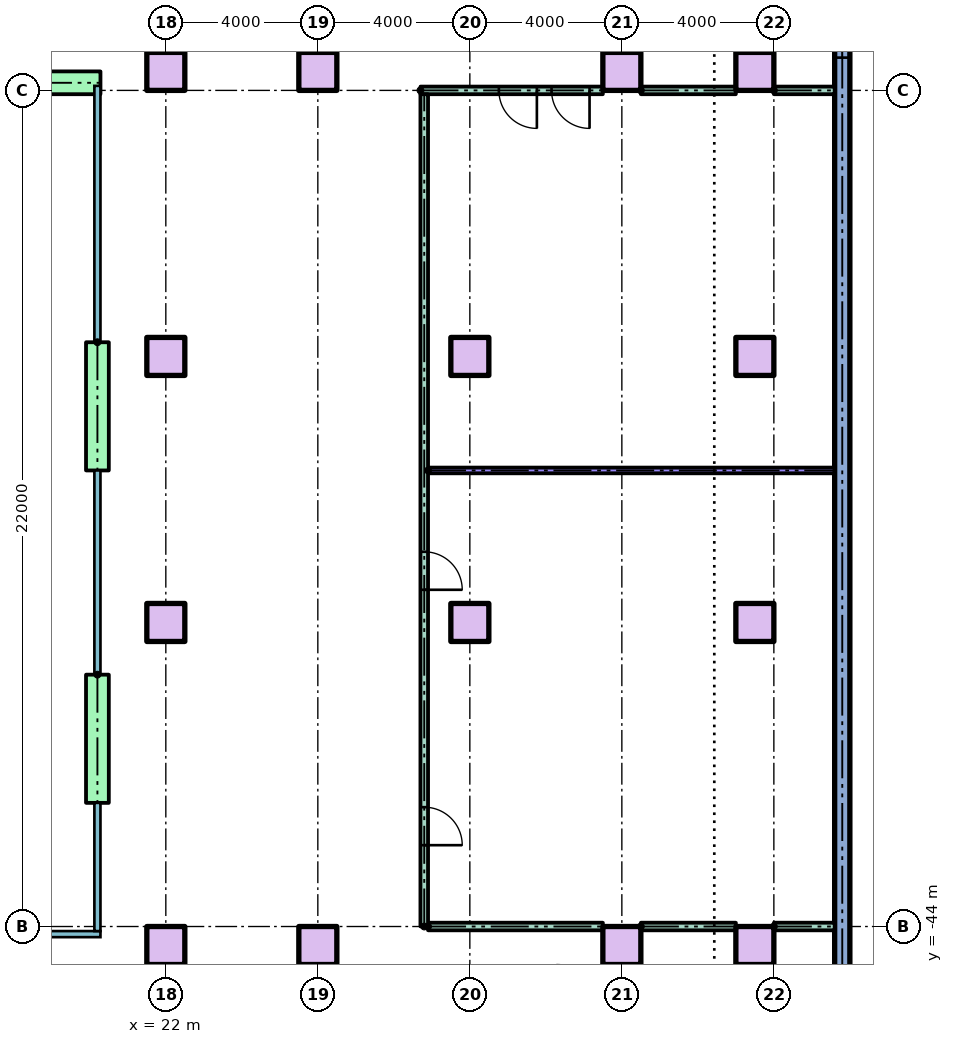
"""IFC4 building model, lengths in metres.
Left out: names, types, materials, properties, quantities, classifications, styles, units other than length and angle.
Written with IfcOpenShell. Run it as: python <this file> out.ifc"""

import sys

from ifc_helpers import new_model, si_unit, direction, frame, frame_2d, origin, origin_2d, place, context, subcontext, project, spatial, rectangle, extrude, element, fill, save


model = new_model("IFC4")
c1 = context("Model", 3, precision=1e-05, world=origin(), true_north=direction((0.0, 1.0)))
c2 = subcontext(c1, "Body", "Model", "MODEL_VIEW")
j1 = project(units=[si_unit("LENGTHUNIT", "METRE"), si_unit("PLANEANGLEUNIT", "RADIAN")], contexts=[c1])
p1 = place(None, origin())
s1 = spatial("IfcSite", under=j1, at=p1, CompositionType="ELEMENT")
p2 = place(p1, origin())
s2 = spatial("IfcBuilding", under=s1, at=p2, CompositionType="ELEMENT")
p3 = place(p2, frame((0.0, 0.0, 14.0)))
s3 = spatial("IfcBuildingStorey", under=s2, at=p3, CompositionType="ELEMENT", Elevation=14.0)
for number, where in (
    (1, (22.0, -44.5, 0.0)),
    (2, (26.0, -44.5, 0.0)),
    (3, (34.0, -44.5, 0.0)),
    (4, (37.5, -44.5, 0.0)),
    (5, (22.0, -36.0, 0.0)),
    (6, (30.0, -36.0, 0.0)),
    (7, (37.5, -36.0, 0.0)),
    (8, (22.0, -29.0, 0.0)),
    (9, (30.0, -29.0, 0.0)),
    (10, (37.5, -29.0, 0.0)),
    (11, (22.0, -21.5, 0.0)),
    (12, (26.0, -21.5, 0.0)),
    (13, (34.0, -21.5, 0.0)),
    (14, (37.5, -21.5, 0.0)),
):
    element("IfcColumn", number, at=place(p3, frame(where)), inside=s3, PredefinedType="COLUMN", context=c2, shape_type="SweptSolid", body=[
        extrude(rectangle(XDim=1.0, YDim=1.0, at=origin_2d()), origin(), (0.0, 0.0, 1.0), 4.0),
    ])
p4 = place(p3, frame((39.8, -50.0, 0.0), z_axis=(0.0, 0.0, 1.0), x_axis=(0.0, 1.0, 0.0)))
e15 = element("IfcWall", 15, at=p4, inside=s3, PredefinedType="STANDARD", context=c2, shape_type="SweptSolid", body=[
    extrude(rectangle(XDim=70.0, YDim=0.4, at=frame_2d((35.0, 0.0))), origin(), (0.0, 0.0, 1.0), 3.7),
])
p5 = place(p4, frame((0.75, 0.0, 0.9)))
e16 = element("IfcOpeningElement", 16, at=p5, cuts=e15, PredefinedType="OPENING", context=c2, shape_type="SweptSolid", body=[
    extrude(rectangle(XDim=2.4, YDim=2.1, at=frame_2d((1.2, 1.05))), frame((0.0, 0.21, 0.0), z_axis=(0.0, -1.0, 0.0), x_axis=(1.0, 0.0, 0.0)), (0.0, 0.0, 1.0), 0.42),
])
p6 = place(p4, frame((28.863, 0.0, 0.9)))
e17 = element("IfcOpeningElement", 17, at=p6, cuts=e15, PredefinedType="OPENING", context=c2, shape_type="SweptSolid", body=[
    extrude(rectangle(XDim=2.4, YDim=2.1, at=frame_2d((1.2, 1.05))), frame((0.0, 0.21, 0.0), z_axis=(0.0, -1.0, 0.0), x_axis=(1.0, 0.0, 0.0)), (0.0, 0.0, 1.0), 0.42),
])
p7 = place(p4, frame((32.988, 0.0, 0.9)))
e18 = element("IfcOpeningElement", 18, at=p7, cuts=e15, PredefinedType="OPENING", context=c2, shape_type="SweptSolid", body=[
    extrude(rectangle(XDim=2.4, YDim=2.1, at=frame_2d((1.2, 1.05))), frame((0.0, 0.21, 0.0), z_axis=(0.0, -1.0, 0.0), x_axis=(1.0, 0.0, 0.0)), (0.0, 0.0, 1.0), 0.42),
])
p8 = place(p4, frame((37.113, 0.0, 0.9)))
e19 = element("IfcOpeningElement", 19, at=p8, cuts=e15, PredefinedType="OPENING", context=c2, shape_type="SweptSolid", body=[
    extrude(rectangle(XDim=2.4, YDim=2.1, at=frame_2d((1.2, 1.05))), frame((0.0, 0.21, 0.0), z_axis=(0.0, -1.0, 0.0), x_axis=(1.0, 0.0, 0.0)), (0.0, 0.0, 1.0), 0.42),
])
p9 = place(p4, frame((41.238, 0.0, 0.9)))
e20 = element("IfcOpeningElement", 20, at=p9, cuts=e15, PredefinedType="OPENING", context=c2, shape_type="SweptSolid", body=[
    extrude(rectangle(XDim=2.4, YDim=2.1, at=frame_2d((1.2, 1.05))), frame((0.0, 0.21, 0.0), z_axis=(0.0, -1.0, 0.0), x_axis=(1.0, 0.0, 0.0)), (0.0, 0.0, 1.0), 0.42),
])
p10 = place(p4, frame((45.363, 0.0, 0.9)))
e21 = element("IfcOpeningElement", 21, at=p10, cuts=e15, PredefinedType="OPENING", context=c2, shape_type="SweptSolid", body=[
    extrude(rectangle(XDim=2.4, YDim=2.1, at=frame_2d((1.2, 1.05))), frame((0.0, 0.21, 0.0), z_axis=(0.0, -1.0, 0.0), x_axis=(1.0, 0.0, 0.0)), (0.0, 0.0, 1.0), 0.42),
])
p11 = place(p4, frame((49.488, 0.0, 0.9)))
e22 = element("IfcOpeningElement", 22, at=p11, cuts=e15, PredefinedType="OPENING", context=c2, shape_type="SweptSolid", body=[
    extrude(rectangle(XDim=2.4, YDim=2.1, at=frame_2d((1.2, 1.05))), frame((0.0, 0.21, 0.0), z_axis=(0.0, -1.0, 0.0), x_axis=(1.0, 0.0, 0.0)), (0.0, 0.0, 1.0), 0.42),
])
p12 = place(p4, frame((53.613, 0.0, 0.9)))
e23 = element("IfcOpeningElement", 23, at=p12, cuts=e15, PredefinedType="OPENING", context=c2, shape_type="SweptSolid", body=[
    extrude(rectangle(XDim=2.4, YDim=2.1, at=frame_2d((1.2, 1.05))), frame((0.0, 0.21, 0.0), z_axis=(0.0, -1.0, 0.0), x_axis=(1.0, 0.0, 0.0)), (0.0, 0.0, 1.0), 0.42),
])
p13 = place(p4, frame((57.738, 0.0, 0.9)))
e24 = element("IfcOpeningElement", 24, at=p13, cuts=e15, PredefinedType="OPENING", context=c2, shape_type="SweptSolid", body=[
    extrude(rectangle(XDim=2.4, YDim=2.1, at=frame_2d((1.2, 1.05))), frame((0.0, 0.21, 0.0), z_axis=(0.0, -1.0, 0.0), x_axis=(1.0, 0.0, 0.0)), (0.0, 0.0, 1.0), 0.42),
])
p14 = place(p4, frame((62.05, 0.0, 0.9)))
e25 = element("IfcOpeningElement", 25, at=p14, cuts=e15, PredefinedType="OPENING", context=c2, shape_type="SweptSolid", body=[
    extrude(rectangle(XDim=2.4, YDim=2.1, at=frame_2d((1.2, 1.05))), frame((0.0, 0.21, 0.0), z_axis=(0.0, -1.0, 0.0), x_axis=(1.0, 0.0, 0.0)), (0.0, 0.0, 1.0), 0.42),
])
p15 = place(p4, frame((66.55, 0.0, 0.9)))
e26 = element("IfcOpeningElement", 26, at=p15, cuts=e15, PredefinedType="OPENING", context=c2, shape_type="SweptSolid", body=[
    extrude(rectangle(XDim=2.4, YDim=2.1, at=frame_2d((1.2, 1.05))), frame((0.0, 0.21, 0.0), z_axis=(0.0, -1.0, 0.0), x_axis=(1.0, 0.0, 0.0)), (0.0, 0.0, 1.0), 0.42),
])
p16 = place(p3, frame((18.53, -21.8, 0.0)))
e27 = element("IfcWall", 27, at=p16, inside=s3, PredefinedType="STANDARD", context=c2, shape_type="SweptSolid", body=[
    extrude(rectangle(XDim=1.75, YDim=0.6, at=frame_2d((0.875, 0.0))), origin(), (0.0, 0.0, 1.0), 3.7),
])
for number, where, z_axis, x_axis in (
    (28, (20.2, -28.627, 0.0), (0.0, 0.0, 1.0), (0.0, -1.0, 0.0)),
    (29, (20.2, -37.373, 0.0), (0.0, 0.0, 1.0), (0.0, -1.0, 0.0)),
):
    element("IfcWall", number, at=place(p3, frame(where, z_axis=z_axis, x_axis=x_axis)), inside=s3, PredefinedType="STANDARD", context=c2, shape_type="SweptSolid", body=[
        extrude(rectangle(XDim=3.373, YDim=0.6, at=frame_2d((1.687, 0.0))), origin(), (0.0, 0.0, 1.0), 3.7),
    ])
p17 = place(p3, frame((28.9, -44.0, 0.0)))
e30 = element("IfcWall", 30, at=p17, inside=s3, PredefinedType="PARTITIONING", context=c2, shape_type="SweptSolid", body=[
    extrude(rectangle(XDim=4.6, YDim=0.2, at=frame_2d((2.3, 0.0))), origin(), (0.0, 0.0, 1.0), 3.7),
])
p18 = place(p3, frame((34.5, -44.0, 0.0)))
e31 = element("IfcWall", 31, at=p18, inside=s3, PredefinedType="PARTITIONING", context=c2, shape_type="SweptSolid", body=[
    extrude(rectangle(XDim=2.5, YDim=0.2, at=frame_2d((1.25, 0.0))), origin(), (0.0, 0.0, 1.0), 3.7),
])
p19 = place(p3, frame((38.0, -44.0, 0.0)))
e32 = element("IfcWall", 32, at=p19, inside=s3, PredefinedType="PARTITIONING", context=c2, shape_type="SweptSolid", body=[
    extrude(rectangle(XDim=1.6, YDim=0.2, at=frame_2d((0.8, 0.0))), origin(), (0.0, 0.0, 1.0), 3.7),
])
p20 = place(p3, frame((28.9, -32.0, 0.0)))
e33 = element("IfcWall", 33, at=p20, inside=s3, PredefinedType="PARTITIONING", context=c2, shape_type="SweptSolid", body=[
    extrude(rectangle(XDim=10.7, YDim=0.15, at=frame_2d((5.35, 0.0))), origin(), (0.0, 0.0, 1.0), 3.7),
])
p21 = place(p3, frame((28.7, -22.0, 0.0)))
e34 = element("IfcWall", 34, at=p21, inside=s3, PredefinedType="PARTITIONING", context=c2, shape_type="SweptSolid", body=[
    extrude(rectangle(XDim=4.8, YDim=0.2, at=frame_2d((2.4, 0.0))), origin(), (0.0, 0.0, 1.0), 3.7),
])
p22 = place(p21, frame((2.064, 0.0, 0.0)))
e35 = element("IfcOpeningElement", 35, at=p22, cuts=e34, PredefinedType="OPENING", context=c2, shape_type="SweptSolid", body=[
    extrude(rectangle(XDim=1.0, YDim=2.1, at=frame_2d((0.5, 1.05))), frame((0.0, 0.11, 0.0), z_axis=(0.0, -1.0, 0.0), x_axis=(1.0, 0.0, 0.0)), (0.0, 0.0, 1.0), 0.22),
])
p23 = place(p21, frame((3.45, 0.0, 0.0)))
e36 = element("IfcOpeningElement", 36, at=p23, cuts=e34, PredefinedType="OPENING", context=c2, shape_type="SweptSolid", body=[
    extrude(rectangle(XDim=1.0, YDim=2.1, at=frame_2d((0.5, 1.05))), frame((0.0, 0.11, 0.0), z_axis=(0.0, -1.0, 0.0), x_axis=(1.0, 0.0, 0.0)), (0.0, 0.0, 1.0), 0.22),
])
p24 = place(p3, frame((34.5, -22.0, 0.0)))
e37 = element("IfcWall", 37, at=p24, inside=s3, PredefinedType="PARTITIONING", context=c2, shape_type="SweptSolid", body=[
    extrude(rectangle(XDim=2.5, YDim=0.2, at=frame_2d((1.25, 0.0))), origin(), (0.0, 0.0, 1.0), 3.7),
])
p25 = place(p3, frame((38.0, -22.0, 0.0)))
e38 = element("IfcWall", 38, at=p25, inside=s3, PredefinedType="PARTITIONING", context=c2, shape_type="SweptSolid", body=[
    extrude(rectangle(XDim=1.6, YDim=0.2, at=frame_2d((0.8, 0.0))), origin(), (0.0, 0.0, 1.0), 3.7),
])
p26 = place(p3, frame((28.8, -44.0, 0.0), z_axis=(0.0, 0.0, 1.0), x_axis=(0.0, 1.0, 0.0)))
e39 = element("IfcWall", 39, at=p26, inside=s3, PredefinedType="PARTITIONING", context=c2, shape_type="SweptSolid", body=[
    extrude(rectangle(XDim=21.9, YDim=0.2, at=frame_2d((10.95, 0.0))), origin(), (0.0, 0.0, 1.0), 3.7),
])
p27 = place(p26, frame((2.14, 0.0, 0.0)))
e40 = element("IfcOpeningElement", 40, at=p27, cuts=e39, PredefinedType="OPENING", context=c2, shape_type="SweptSolid", body=[
    extrude(rectangle(XDim=1.0, YDim=2.1, at=frame_2d((0.5, 1.05))), frame((0.0, 0.11, 0.0), z_axis=(0.0, -1.0, 0.0), x_axis=(1.0, 0.0, 0.0)), (0.0, 0.0, 1.0), 0.22),
])
p28 = place(p26, frame((8.86, 0.0, 0.0)))
e41 = element("IfcOpeningElement", 41, at=p28, cuts=e39, PredefinedType="OPENING", context=c2, shape_type="SweptSolid", body=[
    extrude(rectangle(XDim=1.0, YDim=2.1, at=frame_2d((0.5, 1.05))), frame((0.0, 0.11, 0.0), z_axis=(0.0, -1.0, 0.0), x_axis=(1.0, 0.0, 0.0)), (0.0, 0.0, 1.0), 0.22),
])
p29 = place(p6, origin())
e42 = element("IfcWindow", 42, at=p29, inside=s3, PartitioningType="SINGLE_PANEL", PredefinedType="WINDOW", context=c2, shape_type="SweptSolid", body=[
    extrude(rectangle(XDim=2.4, YDim=2.1, at=frame_2d((1.2, 1.05))), frame((0.0, 0.03, 0.0), z_axis=(0.0, -1.0, 0.0), x_axis=(1.0, 0.0, 0.0)), (0.0, 0.0, 1.0), 0.06),
])
fill(e17, e42)
p30 = place(p27, frame((1.0, 0.0, 0.0), z_axis=(0.0, 0.0, 1.0), x_axis=(-1.0, 0.0, 0.0)))
e43 = element("IfcDoor", 43, at=p30, inside=s3, OperationType="SINGLE_SWING_LEFT", PredefinedType="DOOR", context=c2, shape_type="SweptSolid", body=[
    extrude(rectangle(XDim=1.0, YDim=2.1, at=frame_2d((0.5, 1.05))), frame((0.0, 0.025, 0.0), z_axis=(0.0, -1.0, 0.0), x_axis=(1.0, 0.0, 0.0)), (0.0, 0.0, 1.0), 0.05),
])
fill(e40, e43)
p31 = place(p28, frame((1.0, 0.0, 0.0), z_axis=(0.0, 0.0, 1.0), x_axis=(-1.0, 0.0, 0.0)))
e44 = element("IfcDoor", 44, at=p31, inside=s3, OperationType="SINGLE_SWING_LEFT", PredefinedType="DOOR", context=c2, shape_type="SweptSolid", body=[
    extrude(rectangle(XDim=1.0, YDim=2.1, at=frame_2d((0.5, 1.05))), frame((0.0, 0.025, 0.0), z_axis=(0.0, -1.0, 0.0), x_axis=(1.0, 0.0, 0.0)), (0.0, 0.0, 1.0), 0.05),
])
fill(e41, e44)
p32 = place(p22, frame((1.0, 0.0, 0.0), z_axis=(0.0, 0.0, 1.0), x_axis=(-1.0, 0.0, 0.0)))
e45 = element("IfcDoor", 45, at=p32, inside=s3, OperationType="SINGLE_SWING_RIGHT", PredefinedType="DOOR", context=c2, shape_type="SweptSolid", body=[
    extrude(rectangle(XDim=1.0, YDim=2.1, at=frame_2d((0.5, 1.05))), frame((0.0, 0.025, 0.0), z_axis=(0.0, -1.0, 0.0), x_axis=(1.0, 0.0, 0.0)), (0.0, 0.0, 1.0), 0.05),
])
fill(e35, e45)
p33 = place(p23, frame((1.0, 0.0, 0.0), z_axis=(0.0, 0.0, 1.0), x_axis=(-1.0, 0.0, 0.0)))
e46 = element("IfcDoor", 46, at=p33, inside=s3, OperationType="SINGLE_SWING_RIGHT", PredefinedType="DOOR", context=c2, shape_type="SweptSolid", body=[
    extrude(rectangle(XDim=1.0, YDim=2.1, at=frame_2d((0.5, 1.05))), frame((0.0, 0.025, 0.0), z_axis=(0.0, -1.0, 0.0), x_axis=(1.0, 0.0, 0.0)), (0.0, 0.0, 1.0), 0.05),
])
fill(e36, e46)
save(model, sys.argv[1])
